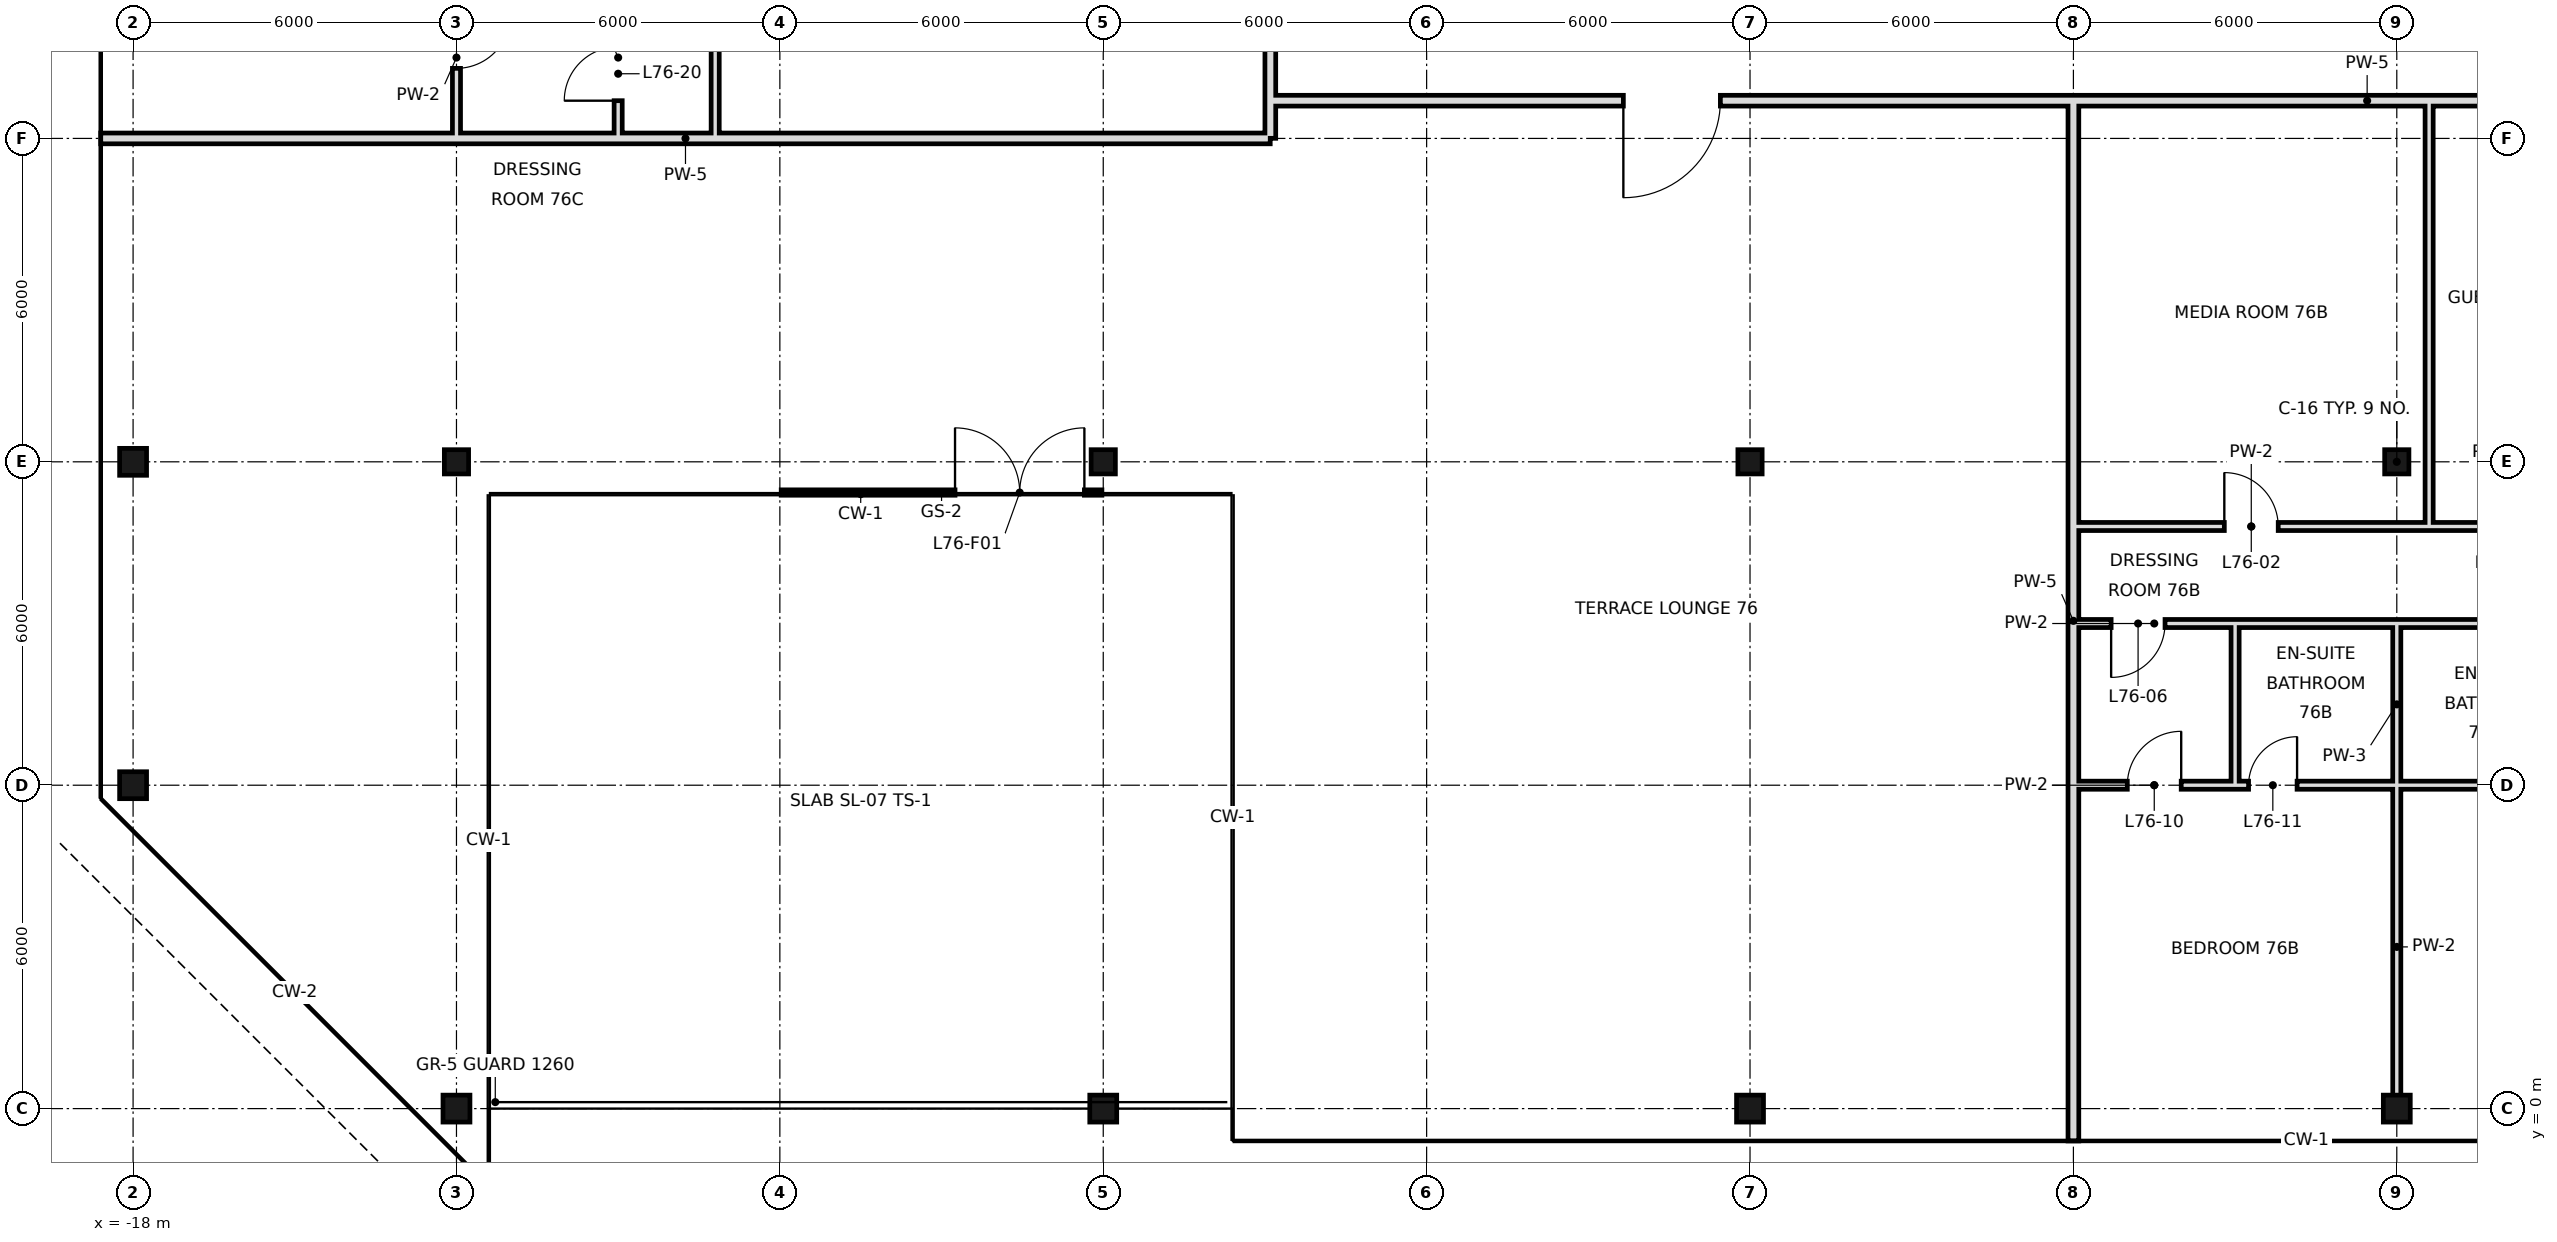
"""IFC4 building model, lengths in metres.
Left out: names, types, materials, properties, quantities, classifications, styles, units other than length and angle.
Written with IfcOpenShell. Run it as: python <this file> out.ifc"""

import sys

from ifc_helpers import new_model, si_unit, direction, frame, frame_2d, origin, origin_with_axes, origin_2d, place, context, subcontext, project, spatial, rectangle, hollow_rectangle, extrude, element, fill, save


model = new_model("IFC4")
c1 = context("Model", 3, precision=1e-05, world=origin(), true_north=direction((0.0, 1.0)))
c2 = subcontext(c1, "Body", "Model", "MODEL_VIEW")
j1 = project(units=[si_unit("LENGTHUNIT", "METRE"), si_unit("PLANEANGLEUNIT", "RADIAN")], contexts=[c1])
p1 = place(None, origin())
s1 = spatial("IfcSite", under=j1, at=p1, CompositionType="ELEMENT")
p2 = place(p1, origin())
s2 = spatial("IfcBuilding", under=s1, at=p2, CompositionType="ELEMENT")
p3 = place(p2, frame((0.0, 0.0, 319.6)))
s3 = spatial("IfcBuildingStorey", under=s2, at=p3, CompositionType="ELEMENT", Elevation=319.6)
for number, where, z_axis, x_axis in (
    (1, (-18.0, 6.0, 0.0), (0.0, 0.0, 1.0), (1.0, 0.0, 0.0)),
    (2, (-18.0, 12.0, 0.0), (0.0, 0.0, 1.0), (1.0, 0.0, 0.0)),
    (3, (-12.0, 0.0, 0.0), (0.0, 0.0, 1.0), (1.0, 0.0, 0.0)),
):
    element("IfcColumn", number, at=place(p3, frame(where, z_axis=z_axis, x_axis=x_axis)), inside=s3, PredefinedType="COLUMN", context=c2, shape_type="SweptSolid", body=[
        extrude(hollow_rectangle(XDim=0.5, YDim=0.5, WallThickness=0.025, at=origin_2d()), origin(), (0.0, 0.0, 1.0), 3.6),
    ])
p4 = place(p3, frame((-12.0, 12.0, 0.0), z_axis=(0.0, 0.0, 1.0), x_axis=(1.0, 0.0, 0.0)))
e4 = element("IfcColumn", 4, at=p4, inside=s3, PredefinedType="COLUMN", context=c2, shape_type="SweptSolid", body=[
    extrude(hollow_rectangle(XDim=0.45, YDim=0.45, WallThickness=0.022, at=origin_2d()), origin(), (0.0, 0.0, 1.0), 3.6),
])
p5 = place(p3, origin_with_axes())
e5 = element("IfcColumn", 5, at=p5, inside=s3, PredefinedType="COLUMN", context=c2, shape_type="SweptSolid", body=[
    extrude(hollow_rectangle(XDim=0.5, YDim=0.5, WallThickness=0.025, at=origin_2d()), origin(), (0.0, 0.0, 1.0), 3.6),
])
p6 = place(p3, frame((0.0, 12.0, 0.0), z_axis=(0.0, 0.0, 1.0), x_axis=(1.0, 0.0, 0.0)))
e6 = element("IfcColumn", 6, at=p6, inside=s3, PredefinedType="COLUMN", context=c2, shape_type="SweptSolid", body=[
    extrude(hollow_rectangle(XDim=0.45, YDim=0.45, WallThickness=0.022, at=origin_2d()), origin(), (0.0, 0.0, 1.0), 3.6),
])
p7 = place(p3, frame((12.0, 0.0, 0.0), z_axis=(0.0, 0.0, 1.0), x_axis=(1.0, 0.0, 0.0)))
e7 = element("IfcColumn", 7, at=p7, inside=s3, PredefinedType="COLUMN", context=c2, shape_type="SweptSolid", body=[
    extrude(hollow_rectangle(XDim=0.5, YDim=0.5, WallThickness=0.025, at=origin_2d()), origin(), (0.0, 0.0, 1.0), 3.6),
])
p8 = place(p3, frame((12.0, 12.0, 0.0), z_axis=(0.0, 0.0, 1.0), x_axis=(1.0, 0.0, 0.0)))
e8 = element("IfcColumn", 8, at=p8, inside=s3, PredefinedType="COLUMN", context=c2, shape_type="SweptSolid", body=[
    extrude(hollow_rectangle(XDim=0.45, YDim=0.45, WallThickness=0.022, at=origin_2d()), origin(), (0.0, 0.0, 1.0), 3.6),
])
p9 = place(p3, frame((24.0, 0.0, 0.0), z_axis=(0.0, 0.0, 1.0), x_axis=(1.0, 0.0, 0.0)))
e9 = element("IfcColumn", 9, at=p9, inside=s3, PredefinedType="COLUMN", context=c2, shape_type="SweptSolid", body=[
    extrude(hollow_rectangle(XDim=0.5, YDim=0.5, WallThickness=0.025, at=origin_2d()), origin(), (0.0, 0.0, 1.0), 3.6),
])
p10 = place(p3, frame((24.0, 12.0, 0.0), z_axis=(0.0, 0.0, 1.0), x_axis=(1.0, 0.0, 0.0)))
e10 = element("IfcColumn", 10, at=p10, inside=s3, PredefinedType="COLUMN", context=c2, shape_type="SweptSolid", body=[
    extrude(hollow_rectangle(XDim=0.45, YDim=0.45, WallThickness=0.022, at=origin_2d()), origin(), (0.0, 0.0, 1.0), 3.6),
])
p11 = place(p3, frame((-5.975, 11.43, 0.0), z_axis=(0.0, 0.0, 1.0), x_axis=(1.0, 0.0, 0.0)))
e11 = element("IfcWall", 11, at=p11, inside=s3, PredefinedType="SOLIDWALL", context=c2, shape_type="SweptSolid", body=[
    extrude(rectangle(XDim=5.95, YDim=0.1, at=frame_2d((2.975, 0.0))), origin(), (0.0, 0.0, 1.0), 3.42),
])
p12 = place(p11, frame((3.225, 0.0, 0.0)))
e12 = element("IfcOpeningElement", 12, at=p12, cuts=e11, PredefinedType="OPENING", context=c2, shape_type="SweptSolid", body=[
    extrude(rectangle(XDim=2.4, YDim=2.4, at=frame_2d((1.2, 1.2))), frame((0.0, 0.06, 0.0), z_axis=(0.0, -1.0, 0.0), x_axis=(1.0, 0.0, 0.0)), (0.0, 0.0, 1.0), 0.12),
])
p13 = place(p3, frame((-12.0, 18.0, 0.0), z_axis=(0.0, 0.0, 1.0), x_axis=(0.0, 1.0, 0.0)))
e13 = element("IfcWall", 13, at=p13, inside=s3, PredefinedType="PARTITIONING", context=c2, shape_type="SweptSolid", body=[
    extrude(rectangle(XDim=3.0, YDim=0.15, at=frame_2d((1.5, 0.0))), origin(), (0.0, 0.0, 1.0), 2.72),
])
p14 = place(p13, frame((1.3, 0.0, 0.0)))
e14 = element("IfcOpeningElement", 14, at=p14, cuts=e13, PredefinedType="OPENING", context=c2, shape_type="SweptSolid", body=[
    extrude(rectangle(XDim=1.0, YDim=2.4, at=frame_2d((0.5, 1.2))), frame((0.0, 0.085, 0.0), z_axis=(0.0, -1.0, 0.0), x_axis=(1.0, 0.0, 0.0)), (0.0, 0.0, 1.0), 0.17),
])
p15 = place(p3, frame((-7.2, 18.0, 0.0), z_axis=(0.0, 0.0, 1.0), x_axis=(0.0, 1.0, 0.0)))
e15 = element("IfcWall", 15, at=p15, inside=s3, PredefinedType="PARTITIONING", context=c2, shape_type="SweptSolid", body=[
    extrude(rectangle(XDim=5.4, YDim=0.15, at=frame_2d((2.7, 0.0))), origin(), (0.0, 0.0, 1.0), 3.42),
])
p16 = place(p15, frame((2.25, 0.0, 0.0)))
e16 = element("IfcOpeningElement", 16, at=p16, cuts=e15, PredefinedType="OPENING", context=c2, shape_type="SweptSolid", body=[
    extrude(rectangle(XDim=0.9, YDim=2.1, at=frame_2d((0.45, 1.05))), frame((0.0, 0.085, 0.0), z_axis=(0.0, -1.0, 0.0), x_axis=(1.0, 0.0, 0.0)), (0.0, 0.0, 1.0), 0.17),
])
p17 = place(p3, frame((-9.0, 18.0, 0.0), z_axis=(0.0, 0.0, 1.0), x_axis=(0.0, 1.0, 0.0)))
e17 = element("IfcWall", 17, at=p17, inside=s3, PredefinedType="PARTITIONING", context=c2, shape_type="SweptSolid", body=[
    extrude(rectangle(XDim=3.0, YDim=0.15, at=frame_2d((1.5, 0.0))), origin(), (0.0, 0.0, 1.0), 3.42),
])
p18 = place(p17, frame((0.7, 0.0, 0.0)))
e18 = element("IfcOpeningElement", 18, at=p18, cuts=e17, PredefinedType="OPENING", context=c2, shape_type="SweptSolid", body=[
    extrude(rectangle(XDim=1.0, YDim=2.4, at=frame_2d((0.5, 1.2))), frame((0.0, 0.085, 0.0), z_axis=(0.0, -1.0, 0.0), x_axis=(1.0, 0.0, 0.0)), (0.0, 0.0, 1.0), 0.17),
])
p19 = place(p3, frame((18.0, -0.6, 0.0), z_axis=(0.0, 0.0, 1.0), x_axis=(0.0, 1.0, 0.0)))
e19 = element("IfcWall", 19, at=p19, inside=s3, PredefinedType="SOLIDWALL", context=c2, shape_type="SweptSolid", body=[
    extrude(rectangle(XDim=19.3, YDim=0.2, at=frame_2d((9.65, 0.0))), origin(), (0.0, 0.0, 1.0), 2.72),
])
p20 = place(p3, frame((21.0, 6.0, 0.0), z_axis=(0.0, 0.0, 1.0), x_axis=(0.0, 1.0, 0.0)))
e20 = element("IfcWall", 20, at=p20, inside=s3, PredefinedType="PARTITIONING", context=c2, shape_type="SweptSolid", body=[
    extrude(rectangle(XDim=3.0, YDim=0.15, at=frame_2d((1.5, 0.0))), origin(), (0.0, 0.0, 1.0), 3.42),
])
p21 = place(p3, frame((24.0, 0.0, 0.0), z_axis=(0.0, 0.0, 1.0), x_axis=(0.0, 1.0, 0.0)))
e21 = element("IfcWall", 21, at=p21, inside=s3, PredefinedType="PARTITIONING", context=c2, shape_type="SweptSolid", body=[
    extrude(rectangle(XDim=6.0, YDim=0.15, at=frame_2d((3.0, 0.0))), origin(), (0.0, 0.0, 1.0), 2.72),
])
p22 = place(p3, frame((24.0, 6.0, 0.0), z_axis=(0.0, 0.0, 1.0), x_axis=(0.0, 1.0, 0.0)))
e22 = element("IfcWall", 22, at=p22, inside=s3, PredefinedType="PARTITIONING", context=c2, shape_type="SweptSolid", body=[
    extrude(rectangle(XDim=3.0, YDim=0.15, at=frame_2d((1.5, 0.0))), origin(), (0.0, 0.0, 1.0), 2.72),
])
p23 = place(p3, frame((24.6, 10.8, 0.0), z_axis=(0.0, 0.0, 1.0), x_axis=(0.0, 1.0, 0.0)))
e23 = element("IfcWall", 23, at=p23, inside=s3, PredefinedType="PARTITIONING", context=c2, shape_type="SweptSolid", body=[
    extrude(rectangle(XDim=7.9, YDim=0.15, at=frame_2d((3.95, 0.0))), origin(), (0.0, 0.0, 1.0), 3.42),
])
p24 = place(p3, frame((3.1, 18.002, 0.0), z_axis=(0.0, 0.0, 1.0), x_axis=(0.0, 1.0, 0.0)))
e24 = element("IfcWall", 24, at=p24, inside=s3, PredefinedType="SOLIDWALL", context=c2, shape_type="SweptSolid", body=[
    extrude(rectangle(XDim=5.398, YDim=0.2, at=frame_2d((2.699, 0.0))), origin(), (0.0, 0.0, 1.0), 3.42),
])
p25 = place(p3, frame((18.0, 10.8, 0.0), z_axis=(0.0, 0.0, 1.0), x_axis=(1.0, 0.0, 0.0)))
e25 = element("IfcWall", 25, at=p25, inside=s3, PredefinedType="PARTITIONING", context=c2, shape_type="SweptSolid", body=[
    extrude(rectangle(XDim=6.6, YDim=0.15, at=frame_2d((3.3, 0.0))), origin(), (0.0, 0.0, 1.0), 3.42),
])
p26 = place(p25, frame((2.8, 0.0, 0.0)))
e26 = element("IfcOpeningElement", 26, at=p26, cuts=e25, PredefinedType="OPENING", context=c2, shape_type="SweptSolid", body=[
    extrude(rectangle(XDim=1.0, YDim=2.4, at=frame_2d((0.5, 1.2))), frame((0.0, 0.085, 0.0), z_axis=(0.0, -1.0, 0.0), x_axis=(1.0, 0.0, 0.0)), (0.0, 0.0, 1.0), 0.17),
])
p27 = place(p3, frame((24.6, 10.8, 0.0), z_axis=(0.0, 0.0, 1.0), x_axis=(1.0, 0.0, 0.0)))
e27 = element("IfcWall", 27, at=p27, inside=s3, PredefinedType="PARTITIONING", context=c2, shape_type="SweptSolid", body=[
    extrude(rectangle(XDim=2.4, YDim=0.15, at=frame_2d((1.2, 0.0))), origin(), (0.0, 0.0, 1.0), 3.42),
])
p28 = place(p27, frame((0.95, 0.0, 0.0)))
e28 = element("IfcOpeningElement", 28, at=p28, cuts=e27, PredefinedType="OPENING", context=c2, shape_type="SweptSolid", body=[
    extrude(rectangle(XDim=0.9, YDim=2.4, at=frame_2d((0.45, 1.2))), frame((0.0, 0.085, 0.0), z_axis=(0.0, -1.0, 0.0), x_axis=(1.0, 0.0, 0.0)), (0.0, 0.0, 1.0), 0.17),
])
p29 = place(p3, frame((-18.6, 18.0, 0.0), z_axis=(0.0, 0.0, 1.0), x_axis=(1.0, 0.0, 0.0)))
e29 = element("IfcWall", 29, at=p29, inside=s3, PredefinedType="SOLIDWALL", context=c2, shape_type="SweptSolid", body=[
    extrude(rectangle(XDim=21.698, YDim=0.2, at=frame_2d((10.849, 0.0))), origin(), (0.0, 0.0, 1.0), 2.72),
])
p30 = place(p3, frame((3.1, 18.7, 0.0), z_axis=(0.0, 0.0, 1.0), x_axis=(1.0, 0.0, 0.0)))
e30 = element("IfcWall", 30, at=p30, inside=s3, PredefinedType="SOLIDWALL", context=c2, shape_type="SweptSolid", body=[
    extrude(rectangle(XDim=40.7, YDim=0.2, at=frame_2d((20.35, 0.0))), origin(), (0.0, 0.0, 1.0), 2.72),
])
p31 = place(p30, frame((25.44, 0.0, 0.0)))
e31 = element("IfcOpeningElement", 31, at=p31, cuts=e30, PredefinedType="OPENING", context=c2, shape_type="SweptSolid", body=[
    extrude(rectangle(XDim=1.2, YDim=2.4, at=frame_2d((0.6, 1.2))), frame((0.0, 0.11, 0.0), z_axis=(0.0, -1.0, 0.0), x_axis=(1.0, 0.0, 0.0)), (0.0, 0.0, 1.0), 0.22),
])
p32 = place(p30, frame((6.55, 0.0, 0.0)))
e32 = element("IfcOpeningElement", 32, at=p32, cuts=e30, PredefinedType="OPENING", context=c2, shape_type="SweptSolid", body=[
    extrude(rectangle(XDim=1.8, YDim=2.4, at=frame_2d((0.9, 1.2))), frame((0.0, 0.11, 0.0), z_axis=(0.0, -1.0, 0.0), x_axis=(1.0, 0.0, 0.0)), (0.0, 0.0, 1.0), 0.22),
])
p33 = place(p3, frame((18.0, 6.0, 0.0), z_axis=(0.0, 0.0, 1.0), x_axis=(1.0, 0.0, 0.0)))
e33 = element("IfcWall", 33, at=p33, inside=s3, PredefinedType="PARTITIONING", context=c2, shape_type="SweptSolid", body=[
    extrude(rectangle(XDim=3.0, YDim=0.15, at=frame_2d((1.5, 0.0))), origin(), (0.0, 0.0, 1.0), 2.97),
])
p34 = place(p33, frame((1.0, 0.0, 0.0)))
e34 = element("IfcOpeningElement", 34, at=p34, cuts=e33, PredefinedType="OPENING", context=c2, shape_type="SweptSolid", body=[
    extrude(rectangle(XDim=1.0, YDim=2.4, at=frame_2d((0.5, 1.2))), frame((0.0, 0.085, 0.0), z_axis=(0.0, -1.0, 0.0), x_axis=(1.0, 0.0, 0.0)), (0.0, 0.0, 1.0), 0.17),
])
p35 = place(p3, frame((21.0, 6.0, 0.0), z_axis=(0.0, 0.0, 1.0), x_axis=(1.0, 0.0, 0.0)))
e35 = element("IfcWall", 35, at=p35, inside=s3, PredefinedType="PARTITIONING", context=c2, shape_type="SweptSolid", body=[
    extrude(rectangle(XDim=6.6, YDim=0.15, at=frame_2d((3.3, 0.0))), origin(), (0.0, 0.0, 1.0), 2.97),
])
p36 = place(p35, frame((0.25, 0.0, 0.0)))
e36 = element("IfcOpeningElement", 36, at=p36, cuts=e35, PredefinedType="OPENING", context=c2, shape_type="SweptSolid", body=[
    extrude(rectangle(XDim=0.9, YDim=2.4, at=frame_2d((0.45, 1.2))), frame((0.0, 0.085, 0.0), z_axis=(0.0, -1.0, 0.0), x_axis=(1.0, 0.0, 0.0)), (0.0, 0.0, 1.0), 0.17),
])
p37 = place(p35, frame((5.45, 0.0, 0.0)))
e37 = element("IfcOpeningElement", 37, at=p37, cuts=e35, PredefinedType="OPENING", context=c2, shape_type="SweptSolid", body=[
    extrude(rectangle(XDim=0.9, YDim=2.4, at=frame_2d((0.45, 1.2))), frame((0.0, 0.085, 0.0), z_axis=(0.0, -1.0, 0.0), x_axis=(1.0, 0.0, 0.0)), (0.0, 0.0, 1.0), 0.17),
])
p38 = place(p3, frame((18.0, 9.0, 0.0), z_axis=(0.0, 0.0, 1.0), x_axis=(1.0, 0.0, 0.0)))
e38 = element("IfcWall", 38, at=p38, inside=s3, PredefinedType="PARTITIONING", context=c2, shape_type="SweptSolid", body=[
    extrude(rectangle(XDim=3.0, YDim=0.15, at=frame_2d((1.5, 0.0))), origin(), (0.0, 0.0, 1.0), 3.42),
])
p39 = place(p38, frame((0.7, 0.0, 0.0)))
e39 = element("IfcOpeningElement", 39, at=p39, cuts=e38, PredefinedType="OPENING", context=c2, shape_type="SweptSolid", body=[
    extrude(rectangle(XDim=1.0, YDim=2.4, at=frame_2d((0.5, 1.2))), frame((0.0, 0.085, 0.0), z_axis=(0.0, -1.0, 0.0), x_axis=(1.0, 0.0, 0.0)), (0.0, 0.0, 1.0), 0.17),
])
p40 = place(p3, frame((21.0, 9.0, 0.0), z_axis=(0.0, 0.0, 1.0), x_axis=(1.0, 0.0, 0.0)))
e40 = element("IfcWall", 40, at=p40, inside=s3, PredefinedType="PARTITIONING", context=c2, shape_type="SweptSolid", body=[
    extrude(rectangle(XDim=6.6, YDim=0.15, at=frame_2d((3.3, 0.0))), origin(), (0.0, 0.0, 1.0), 3.42),
])
p41 = place(p12, origin())
e41 = element("IfcDoor", 41, at=p41, inside=s3, OperationType="DOUBLE_DOOR_SINGLE_SWING", PredefinedType="DOOR", context=c2, shape_type="SweptSolid", body=[
    extrude(rectangle(XDim=2.4, YDim=2.4, at=frame_2d((1.2, 1.2))), frame((0.0, 0.025, 0.0), z_axis=(0.0, -1.0, 0.0), x_axis=(1.0, 0.0, 0.0)), (0.0, 0.0, 1.0), 0.05),
])
fill(e12, e41)
p42 = place(p26, origin())
e42 = element("IfcDoor", 42, at=p42, inside=s3, OperationType="SINGLE_SWING_LEFT", PredefinedType="DOOR", context=c2, shape_type="SweptSolid", body=[
    extrude(rectangle(XDim=1.0, YDim=2.4, at=frame_2d((0.5, 1.2))), frame((0.0, 0.025, 0.0), z_axis=(0.0, -1.0, 0.0), x_axis=(1.0, 0.0, 0.0)), (0.0, 0.0, 1.0), 0.05),
])
fill(e26, e42)
p43 = place(p39, frame((1.0, 0.0, 0.0), z_axis=(0.0, 0.0, 1.0), x_axis=(-1.0, 0.0, 0.0)))
e43 = element("IfcDoor", 43, at=p43, inside=s3, OperationType="SINGLE_SWING_RIGHT", PredefinedType="DOOR", context=c2, shape_type="SweptSolid", body=[
    extrude(rectangle(XDim=1.0, YDim=2.4, at=frame_2d((0.5, 1.2))), frame((0.0, 0.025, 0.0), z_axis=(0.0, -1.0, 0.0), x_axis=(1.0, 0.0, 0.0)), (0.0, 0.0, 1.0), 0.05),
])
fill(e39, e43)
p44 = place(p34, frame((1.0, 0.0, 0.0), z_axis=(0.0, 0.0, 1.0), x_axis=(-1.0, 0.0, 0.0)))
e44 = element("IfcDoor", 44, at=p44, inside=s3, OperationType="SINGLE_SWING_LEFT", PredefinedType="DOOR", context=c2, shape_type="SweptSolid", body=[
    extrude(rectangle(XDim=1.0, YDim=2.4, at=frame_2d((0.5, 1.2))), frame((0.0, 0.025, 0.0), z_axis=(0.0, -1.0, 0.0), x_axis=(1.0, 0.0, 0.0)), (0.0, 0.0, 1.0), 0.05),
])
fill(e34, e44)
p45 = place(p36, frame((0.9, 0.0, 0.0), z_axis=(0.0, 0.0, 1.0), x_axis=(-1.0, 0.0, 0.0)))
e45 = element("IfcDoor", 45, at=p45, inside=s3, OperationType="SINGLE_SWING_LEFT", PredefinedType="DOOR", context=c2, shape_type="SweptSolid", body=[
    extrude(rectangle(XDim=0.9, YDim=2.4, at=frame_2d((0.45, 1.2))), frame((0.0, 0.025, 0.0), z_axis=(0.0, -1.0, 0.0), x_axis=(1.0, 0.0, 0.0)), (0.0, 0.0, 1.0), 0.05),
])
fill(e36, e45)
p46 = place(p18, origin())
e46 = element("IfcDoor", 46, at=p46, inside=s3, OperationType="SINGLE_SWING_LEFT", PredefinedType="DOOR", context=c2, shape_type="SweptSolid", body=[
    extrude(rectangle(XDim=1.0, YDim=2.4, at=frame_2d((0.5, 1.2))), frame((0.0, 0.025, 0.0), z_axis=(0.0, -1.0, 0.0), x_axis=(1.0, 0.0, 0.0)), (0.0, 0.0, 1.0), 0.05),
])
fill(e18, e46)
p47 = place(p14, origin())
e47 = element("IfcDoor", 47, at=p47, inside=s3, OperationType="SINGLE_SWING_RIGHT", PredefinedType="DOOR", context=c2, shape_type="SweptSolid", body=[
    extrude(rectangle(XDim=1.0, YDim=2.4, at=frame_2d((0.5, 1.2))), frame((0.0, 0.025, 0.0), z_axis=(0.0, -1.0, 0.0), x_axis=(1.0, 0.0, 0.0)), (0.0, 0.0, 1.0), 0.05),
])
fill(e14, e47)
p48 = place(p32, frame((1.8, 0.0, 0.0), z_axis=(0.0, 0.0, 1.0), x_axis=(-1.0, 0.0, 0.0)))
e48 = element("IfcDoor", 48, at=p48, inside=s3, OperationType="SINGLE_SWING_RIGHT", PredefinedType="DOOR", context=c2, shape_type="SweptSolid", body=[
    extrude(rectangle(XDim=1.8, YDim=2.4, at=frame_2d((0.9, 1.2))), frame((0.0, 0.025, 0.0), z_axis=(0.0, -1.0, 0.0), x_axis=(1.0, 0.0, 0.0)), (0.0, 0.0, 1.0), 0.05),
])
fill(e32, e48)
save(model, sys.argv[1])
